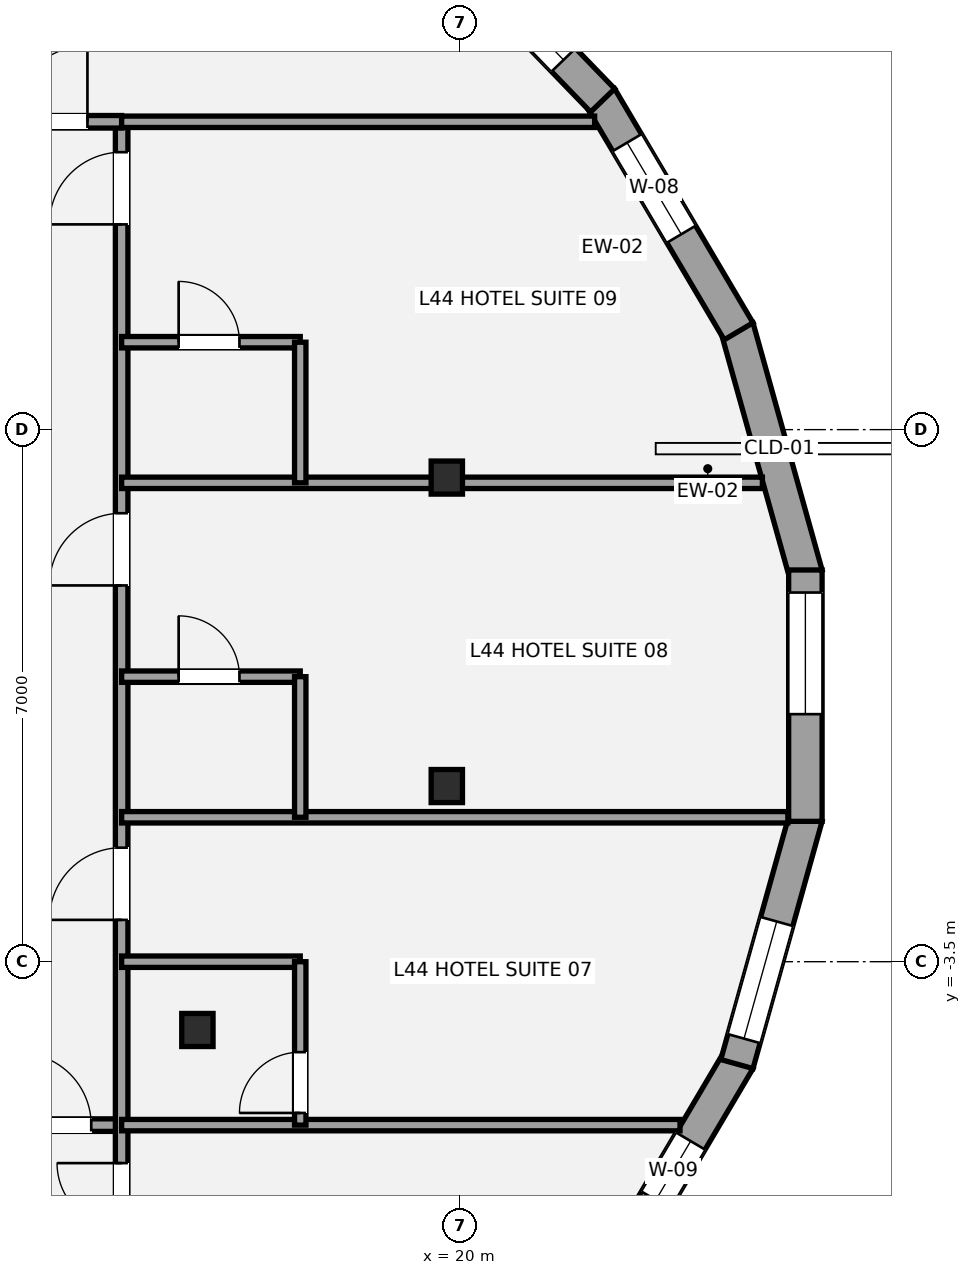
"""IFC4 building model, lengths in metres.
Left out: names, types, materials, properties, quantities, classifications, styles, units other than length and angle.
Written with IfcOpenShell. Run it as: python <this file> out.ifc"""

import sys

from ifc_helpers import new_model, si_unit, direction, frame, frame_2d, origin, origin_2d, place, context, subcontext, project, spatial, rectangle, i_section, extrude, element, fill, save


model = new_model("IFC4")
c1 = context("Model", 3, precision=1e-05, world=origin(), true_north=direction((0.0, 1.0)))
c2 = subcontext(c1, "Body", "Model", "MODEL_VIEW")
j1 = project(units=[si_unit("LENGTHUNIT", "METRE"), si_unit("PLANEANGLEUNIT", "RADIAN")], contexts=[c1])
p1 = place(None, origin())
s1 = spatial("IfcSite", under=j1, at=p1, CompositionType="ELEMENT")
p2 = place(p1, origin())
s2 = spatial("IfcBuilding", under=s1, at=p2, CompositionType="ELEMENT")
p3 = place(p2, frame((0.0, 0.0, 163.0)))
s3 = spatial("IfcBuildingStorey", under=s2, at=p3, CompositionType="ELEMENT", Elevation=163.0)
for number, where, z_axis, x_axis in (
    (1, (19.828, 2.869, 0.0), (0.0, 0.0, 1.0), (1.0, 0.0, 0.0)),
    (2, (16.547, -4.398, 0.0), (0.0, 0.0, 1.0), (1.0, 0.0, 0.0)),
    (3, (19.828, -1.189, 0.0), (0.0, 0.0, 1.0), (1.0, 0.0, 0.0)),
):
    element("IfcColumn", number, at=place(p3, frame(where, z_axis=z_axis, x_axis=x_axis)), inside=s3, PredefinedType="COLUMN", context=c2, shape_type="SweptSolid", body=[
        extrude(i_section(OverallWidth=0.412, OverallDepth=0.435, WebThickness=0.036, FlangeThickness=0.057, at=origin_2d()), origin(), (0.0, 0.0, 1.0), 3.2),
    ])
p4 = place(p3, frame((23.645, 4.846, 0.0), z_axis=(0.0, 0.0, 1.0), x_axis=(0.269235699479, -0.963074315993, 0.0)))
e4 = element("IfcWall", 4, at=p4, inside=s3, PredefinedType="STANDARD", context=c2, shape_type="SweptSolid", body=[
    extrude(rectangle(XDim=3.377, YDim=0.44, at=frame_2d((1.688, 0.0))), origin(), (0.0, 0.0, 1.0), 2.315),
])
p5 = place(p3, frame((21.847, 7.873, 0.0), z_axis=(0.0, 0.0, 1.0), x_axis=(0.508883387051, -0.860835465338, 0.0)))
e5 = element("IfcWall", 5, at=p5, inside=s3, PredefinedType="STANDARD", context=c2, shape_type="SweptSolid", body=[
    extrude(rectangle(XDim=3.577, YDim=0.44, at=frame_2d((1.788, 0.0))), origin(), (0.0, 0.0, 1.0), 2.315),
])
p6 = place(p5, frame((0.694, 0.0, 0.58)))
e6 = element("IfcOpeningElement", 6, at=p6, cuts=e5, PredefinedType="OPENING", context=c2, shape_type="SweptSolid", body=[
    extrude(rectangle(XDim=1.4, YDim=1.55, at=frame_2d((0.7, 0.775))), frame((0.0, 0.23, 0.0), z_axis=(0.0, -1.0, 0.0), x_axis=(1.0, 0.0, 0.0)), (0.0, 0.0, 1.0), 0.46),
])
p7 = place(p3, frame((19.192, 10.612, 0.0), z_axis=(0.0, 0.0, 1.0), x_axis=(0.694975307772, -0.719033602544, 0.0)))
e7 = element("IfcWall", 7, at=p7, inside=s3, PredefinedType="STANDARD", context=c2, shape_type="SweptSolid", body=[
    extrude(rectangle(XDim=3.866, YDim=0.44, at=frame_2d((1.933, 0.0))), origin(), (0.0, 0.0, 1.0), 2.315),
])
p8 = place(p7, frame((1.526, 0.0, 0.58)))
e8 = element("IfcOpeningElement", 8, at=p8, cuts=e7, PredefinedType="OPENING", context=c2, shape_type="SweptSolid", body=[
    extrude(rectangle(XDim=1.6, YDim=1.55, at=frame_2d((0.8, 0.775))), frame((0.0, 0.23, 0.0), z_axis=(0.0, -1.0, 0.0), x_axis=(1.0, 0.0, 0.0)), (0.0, 0.0, 1.0), 0.46),
])
p9 = place(p3, frame((23.667, -4.794, 0.0), z_axis=(0.0, 0.0, 1.0), x_axis=(-0.508883387051, -0.860835465338, 0.0)))
e9 = element("IfcWall", 9, at=p9, inside=s3, PredefinedType="STANDARD", context=c2, shape_type="SweptSolid", body=[
    extrude(rectangle(XDim=3.577, YDim=0.44, at=frame_2d((1.788, 0.0))), origin(), (0.0, 0.0, 1.0), 2.315),
])
p10 = place(p9, frame((1.239, 0.0, 0.58)))
e10 = element("IfcOpeningElement", 10, at=p10, cuts=e9, PredefinedType="OPENING", context=c2, shape_type="SweptSolid", body=[
    extrude(rectangle(XDim=0.9, YDim=1.35, at=frame_2d((0.45, 0.675))), frame((0.0, 0.23, 0.0), z_axis=(0.0, -1.0, 0.0), x_axis=(1.0, 0.0, 0.0)), (0.0, 0.0, 1.0), 0.46),
])
p11 = place(p3, frame((24.554, -1.594, 0.0), z_axis=(0.0, 0.0, 1.0), x_axis=(-0.269235699479, -0.963074315993, 0.0)))
e11 = element("IfcWall", 11, at=p11, inside=s3, PredefinedType="STANDARD", context=c2, shape_type="SweptSolid", body=[
    extrude(rectangle(XDim=3.377, YDim=0.44, at=frame_2d((1.688, 0.0))), origin(), (0.0, 0.0, 1.0), 2.315),
])
p12 = place(p11, frame((1.429, 0.0, 0.58)))
e12 = element("IfcOpeningElement", 12, at=p12, cuts=e11, PredefinedType="OPENING", context=c2, shape_type="SweptSolid", body=[
    extrude(rectangle(XDim=1.6, YDim=1.55, at=frame_2d((0.8, 0.775))), frame((0.0, 0.23, 0.0), z_axis=(0.0, -1.0, 0.0), x_axis=(1.0, 0.0, 0.0)), (0.0, 0.0, 1.0), 0.46),
])
p13 = place(p3, frame((24.546, 1.654, 0.0), z_axis=(0.0, 0.0, 1.0), x_axis=(0.0, -1.0, 0.0)))
e13 = element("IfcWall", 13, at=p13, inside=s3, PredefinedType="STANDARD", context=c2, shape_type="SweptSolid", body=[
    extrude(rectangle(XDim=3.307, YDim=0.44, at=frame_2d((1.654, 0.0))), origin(), (0.0, 0.0, 1.0), 2.315),
])
p14 = place(p13, frame((0.297, 0.0, 0.58)))
e14 = element("IfcOpeningElement", 14, at=p14, cuts=e13, PredefinedType="OPENING", context=c2, shape_type="SweptSolid", body=[
    extrude(rectangle(XDim=1.6, YDim=1.55, at=frame_2d((0.8, 0.775))), frame((0.0, 0.23, 0.0), z_axis=(0.0, -1.0, 0.0), x_axis=(1.0, 0.0, 0.0)), (0.0, 0.0, 1.0), 0.46),
])
p15 = place(p3, frame((-15.95, -5.65, 0.0), z_axis=(0.0, 0.0, 1.0), x_axis=(1.0, 0.0, 0.0)))
e15 = element("IfcWall", 15, at=p15, inside=s3, PredefinedType="PARTITIONING", context=c2, shape_type="SweptSolid", body=[
    extrude(rectangle(XDim=31.5, YDim=0.165, at=frame_2d((15.75, 0.0))), origin(), (0.0, 0.0, 1.0), 2.398),
])
p16 = place(p15, frame((4.8, 0.0, 0.0)))
e16 = element("IfcOpeningElement", 16, at=p16, cuts=e15, PredefinedType="OPENING", context=c2, shape_type="SweptSolid", body=[
    extrude(rectangle(XDim=0.95, YDim=2.15, at=frame_2d((0.475, 1.075))), frame((0.0, 0.093, 0.0), z_axis=(0.0, -1.0, 0.0), x_axis=(1.0, 0.0, 0.0)), (0.0, 0.0, 1.0), 0.185),
])
p17 = place(p15, frame((12.8, 0.0, 0.0)))
e17 = element("IfcOpeningElement", 17, at=p17, cuts=e15, PredefinedType="OPENING", context=c2, shape_type="SweptSolid", body=[
    extrude(rectangle(XDim=0.95, YDim=2.15, at=frame_2d((0.475, 1.075))), frame((0.0, 0.093, 0.0), z_axis=(0.0, -1.0, 0.0), x_axis=(1.0, 0.0, 0.0)), (0.0, 0.0, 1.0), 0.185),
])
p18 = place(p15, frame((20.8, 0.0, 0.0)))
e18 = element("IfcOpeningElement", 18, at=p18, cuts=e15, PredefinedType="OPENING", context=c2, shape_type="SweptSolid", body=[
    extrude(rectangle(XDim=0.95, YDim=2.15, at=frame_2d((0.475, 1.075))), frame((0.0, 0.093, 0.0), z_axis=(0.0, -1.0, 0.0), x_axis=(1.0, 0.0, 0.0)), (0.0, 0.0, 1.0), 0.185),
])
p19 = place(p15, frame((30.15, 0.0, 0.0)))
e19 = element("IfcOpeningElement", 19, at=p19, cuts=e15, PredefinedType="OPENING", context=c2, shape_type="SweptSolid", body=[
    extrude(rectangle(XDim=0.95, YDim=2.15, at=frame_2d((0.475, 1.075))), frame((0.0, 0.093, 0.0), z_axis=(0.0, -1.0, 0.0), x_axis=(1.0, 0.0, 0.0)), (0.0, 0.0, 1.0), 0.185),
])
p20 = place(p3, frame((15.55, -12.773, 0.0), z_axis=(0.0, 0.0, 1.0), x_axis=(0.0, 1.0, 0.0)))
e20 = element("IfcWall", 20, at=p20, inside=s3, PredefinedType="PARTITIONING", context=c2, shape_type="SweptSolid", body=[
    extrude(rectangle(XDim=20.323, YDim=0.165, at=frame_2d((10.162, 0.0))), origin(), (0.0, 0.0, 1.0), 2.473),
])
p21 = place(p20, frame((5.773, 0.0, 0.0)))
e21 = element("IfcOpeningElement", 21, at=p21, cuts=e20, PredefinedType="OPENING", context=c2, shape_type="SweptSolid", body=[
    extrude(rectangle(XDim=0.85, YDim=2.1, at=frame_2d((0.425, 1.05))), frame((0.0, 0.093, 0.0), z_axis=(0.0, -1.0, 0.0), x_axis=(1.0, 0.0, 0.0)), (0.0, 0.0, 1.0), 0.185),
])
p22 = place(p20, frame((9.823, 0.0, 0.0)))
e22 = element("IfcOpeningElement", 22, at=p22, cuts=e20, PredefinedType="OPENING", context=c2, shape_type="SweptSolid", body=[
    extrude(rectangle(XDim=0.95, YDim=2.15, at=frame_2d((0.475, 1.075))), frame((0.0, 0.093, 0.0), z_axis=(0.0, -1.0, 0.0), x_axis=(1.0, 0.0, 0.0)), (0.0, 0.0, 1.0), 0.185),
])
p23 = place(p20, frame((14.223, 0.0, 0.0)))
e23 = element("IfcOpeningElement", 23, at=p23, cuts=e20, PredefinedType="OPENING", context=c2, shape_type="SweptSolid", body=[
    extrude(rectangle(XDim=0.95, YDim=2.15, at=frame_2d((0.475, 1.075))), frame((0.0, 0.093, 0.0), z_axis=(0.0, -1.0, 0.0), x_axis=(1.0, 0.0, 0.0)), (0.0, 0.0, 1.0), 0.185),
])
p24 = place(p20, frame((18.973, 0.0, 0.0)))
e24 = element("IfcOpeningElement", 24, at=p24, cuts=e20, PredefinedType="OPENING", context=c2, shape_type="SweptSolid", body=[
    extrude(rectangle(XDim=0.95, YDim=2.15, at=frame_2d((0.475, 1.075))), frame((0.0, 0.093, 0.0), z_axis=(0.0, -1.0, 0.0), x_axis=(1.0, 0.0, 0.0)), (0.0, 0.0, 1.0), 0.185),
])
p25 = place(p3, frame((13.8, 7.55, 0.0), z_axis=(0.0, 0.0, 1.0), x_axis=(1.0, 0.0, 0.0)))
e25 = element("IfcWall", 25, at=p25, inside=s3, PredefinedType="PARTITIONING", context=c2, shape_type="SweptSolid", body=[
    extrude(rectangle(XDim=1.75, YDim=0.165, at=frame_2d((0.875, 0.0))), origin(), (0.0, 0.0, 1.0), 2.473),
])
p26 = place(p25, frame((0.3, 0.0, 0.0)))
e26 = element("IfcOpeningElement", 26, at=p26, cuts=e25, PredefinedType="OPENING", context=c2, shape_type="SweptSolid", body=[
    extrude(rectangle(XDim=1.0, YDim=2.15, at=frame_2d((0.5, 1.075))), frame((0.0, 0.093, 0.0), z_axis=(0.0, -1.0, 0.0), x_axis=(1.0, 0.0, 0.0)), (0.0, 0.0, 1.0), 0.185),
])
p27 = place(p3, frame((15.55, 7.55, 0.0), z_axis=(0.0, 0.0, 1.0), x_axis=(1.0, 0.0, 0.0)))
e27 = element("IfcWall", 27, at=p27, inside=s3, PredefinedType="PLUMBINGWALL", context=c2, shape_type="SweptSolid", body=[
    extrude(rectangle(XDim=6.223, YDim=0.15, at=frame_2d((3.112, 0.0))), origin(), (0.0, 0.0, 1.0), 2.473),
])
p28 = place(p3, frame((15.55, -5.65, 0.0), z_axis=(0.0, 0.0, 1.0), x_axis=(1.0, 0.0, 0.0)))
e28 = element("IfcWall", 28, at=p28, inside=s3, PredefinedType="PLUMBINGWALL", context=c2, shape_type="SweptSolid", body=[
    extrude(rectangle(XDim=7.346, YDim=0.15, at=frame_2d((3.673, 0.0))), origin(), (0.0, 0.0, 1.0), 2.473),
])
p29 = place(p3, frame((15.55, -1.6, 0.0), z_axis=(0.0, 0.0, 1.0), x_axis=(1.0, 0.0, 0.0)))
e29 = element("IfcWall", 29, at=p29, inside=s3, PredefinedType="PLUMBINGWALL", context=c2, shape_type="SweptSolid", body=[
    extrude(rectangle(XDim=8.766, YDim=0.15, at=frame_2d((4.383, 0.0))), origin(), (0.0, 0.0, 1.0), 2.398),
])
p30 = place(p3, frame((15.55, 2.8, 0.0), z_axis=(0.0, 0.0, 1.0), x_axis=(1.0, 0.0, 0.0)))
e30 = element("IfcWall", 30, at=p30, inside=s3, PredefinedType="PLUMBINGWALL", context=c2, shape_type="SweptSolid", body=[
    extrude(rectangle(XDim=8.43, YDim=0.15, at=frame_2d((4.215, 0.0))), origin(), (0.0, 0.0, 1.0), 2.473),
])
p31 = place(p3, frame((15.55, -3.5, 0.0), z_axis=(0.0, 0.0, 1.0), x_axis=(1.0, 0.0, 0.0)))
e31 = element("IfcWall", 31, at=p31, inside=s3, PredefinedType="PLUMBINGWALL", context=c2, shape_type="SweptSolid", body=[
    extrude(rectangle(XDim=2.35, YDim=0.15, at=frame_2d((1.175, 0.0))), origin(), (0.0, 0.0, 1.0), 2.398),
])
p32 = place(p3, frame((17.9, -5.65, 0.0), z_axis=(0.0, 0.0, 1.0), x_axis=(0.0, 1.0, 0.0)))
e32 = element("IfcWall", 32, at=p32, inside=s3, PredefinedType="PLUMBINGWALL", context=c2, shape_type="SweptSolid", body=[
    extrude(rectangle(XDim=2.15, YDim=0.15, at=frame_2d((1.075, 0.0))), origin(), (0.0, 0.0, 1.0), 3.02),
])
p33 = place(p32, frame((0.16, 0.0, 0.0)))
e33 = element("IfcOpeningElement", 33, at=p33, cuts=e32, PredefinedType="OPENING", context=c2, shape_type="SweptSolid", body=[
    extrude(rectangle(XDim=0.8, YDim=2.1, at=frame_2d((0.4, 1.05))), frame((0.0, 0.085, 0.0), z_axis=(0.0, -1.0, 0.0), x_axis=(1.0, 0.0, 0.0)), (0.0, 0.0, 1.0), 0.17),
])
p34 = place(p3, frame((15.55, 0.25, 0.0), z_axis=(0.0, 0.0, 1.0), x_axis=(1.0, 0.0, 0.0)))
e34 = element("IfcWall", 34, at=p34, inside=s3, PredefinedType="PLUMBINGWALL", context=c2, shape_type="SweptSolid", body=[
    extrude(rectangle(XDim=2.35, YDim=0.15, at=frame_2d((1.175, 0.0))), origin(), (0.0, 0.0, 1.0), 2.473),
])
p35 = place(p34, frame((0.75, 0.0, 0.0)))
e35 = element("IfcOpeningElement", 35, at=p35, cuts=e34, PredefinedType="OPENING", context=c2, shape_type="SweptSolid", body=[
    extrude(rectangle(XDim=0.8, YDim=2.1, at=frame_2d((0.4, 1.05))), frame((0.0, 0.085, 0.0), z_axis=(0.0, -1.0, 0.0), x_axis=(1.0, 0.0, 0.0)), (0.0, 0.0, 1.0), 0.17),
])
p36 = place(p3, frame((17.9, -1.6, 0.0), z_axis=(0.0, 0.0, 1.0), x_axis=(0.0, 1.0, 0.0)))
e36 = element("IfcWall", 36, at=p36, inside=s3, PredefinedType="PLUMBINGWALL", context=c2, shape_type="SweptSolid", body=[
    extrude(rectangle(XDim=1.85, YDim=0.15, at=frame_2d((0.925, 0.0))), origin(), (0.0, 0.0, 1.0), 3.02),
])
p37 = place(p3, frame((15.55, 4.65, 0.0), z_axis=(0.0, 0.0, 1.0), x_axis=(1.0, 0.0, 0.0)))
e37 = element("IfcWall", 37, at=p37, inside=s3, PredefinedType="PLUMBINGWALL", context=c2, shape_type="SweptSolid", body=[
    extrude(rectangle(XDim=2.35, YDim=0.15, at=frame_2d((1.175, 0.0))), origin(), (0.0, 0.0, 1.0), 2.473),
])
p38 = place(p37, frame((0.75, 0.0, 0.0)))
e38 = element("IfcOpeningElement", 38, at=p38, cuts=e37, PredefinedType="OPENING", context=c2, shape_type="SweptSolid", body=[
    extrude(rectangle(XDim=0.8, YDim=2.1, at=frame_2d((0.4, 1.05))), frame((0.0, 0.085, 0.0), z_axis=(0.0, -1.0, 0.0), x_axis=(1.0, 0.0, 0.0)), (0.0, 0.0, 1.0), 0.17),
])
p39 = place(p3, frame((17.9, 2.8, 0.0), z_axis=(0.0, 0.0, 1.0), x_axis=(0.0, 1.0, 0.0)))
e39 = element("IfcWall", 39, at=p39, inside=s3, PredefinedType="PLUMBINGWALL", context=c2, shape_type="SweptSolid", body=[
    extrude(rectangle(XDim=1.85, YDim=0.15, at=frame_2d((0.925, 0.0))), origin(), (0.0, 0.0, 1.0), 2.473),
])
p40 = place(p6, origin())
e40 = element("IfcWindow", 40, at=p40, inside=s3, PartitioningType="SINGLE_PANEL", PredefinedType="WINDOW", context=c2, shape_type="SweptSolid", body=[
    extrude(rectangle(XDim=1.4, YDim=1.55, at=frame_2d((0.7, 0.775))), frame((0.0, -0.01, 0.0), z_axis=(0.0, -1.0, 0.0), x_axis=(1.0, 0.0, 0.0)), (0.0, 0.0, 1.0), 0.06),
])
fill(e6, e40)
p41 = place(p8, origin())
e41 = element("IfcWindow", 41, at=p41, inside=s3, PartitioningType="SINGLE_PANEL", PredefinedType="WINDOW", context=c2, shape_type="SweptSolid", body=[
    extrude(rectangle(XDim=1.6, YDim=1.55, at=frame_2d((0.8, 0.775))), frame((0.0, -0.01, 0.0), z_axis=(0.0, -1.0, 0.0), x_axis=(1.0, 0.0, 0.0)), (0.0, 0.0, 1.0), 0.06),
])
fill(e8, e41)
p42 = place(p10, origin())
e42 = element("IfcWindow", 42, at=p42, inside=s3, PartitioningType="SINGLE_PANEL", PredefinedType="WINDOW", context=c2, shape_type="SweptSolid", body=[
    extrude(rectangle(XDim=0.9, YDim=1.35, at=frame_2d((0.45, 0.675))), frame((0.0, -0.01, 0.0), z_axis=(0.0, -1.0, 0.0), x_axis=(1.0, 0.0, 0.0)), (0.0, 0.0, 1.0), 0.06),
])
fill(e10, e42)
p43 = place(p12, origin())
e43 = element("IfcWindow", 43, at=p43, inside=s3, PartitioningType="SINGLE_PANEL", PredefinedType="WINDOW", context=c2, shape_type="SweptSolid", body=[
    extrude(rectangle(XDim=1.6, YDim=1.55, at=frame_2d((0.8, 0.775))), frame((0.0, -0.01, 0.0), z_axis=(0.0, -1.0, 0.0), x_axis=(1.0, 0.0, 0.0)), (0.0, 0.0, 1.0), 0.06),
])
fill(e12, e43)
p44 = place(p14, origin())
e44 = element("IfcWindow", 44, at=p44, inside=s3, PartitioningType="SINGLE_PANEL", PredefinedType="WINDOW", context=c2, shape_type="SweptSolid", body=[
    extrude(rectangle(XDim=1.6, YDim=1.55, at=frame_2d((0.8, 0.775))), frame((0.0, -0.01, 0.0), z_axis=(0.0, -1.0, 0.0), x_axis=(1.0, 0.0, 0.0)), (0.0, 0.0, 1.0), 0.06),
])
fill(e14, e44)
p45 = place(p26, origin())
e45 = element("IfcDoor", 45, at=p45, inside=s3, OperationType="SINGLE_SWING_RIGHT", PredefinedType="DOOR", context=c2, shape_type="SweptSolid", body=[
    extrude(rectangle(XDim=1.0, YDim=2.15, at=frame_2d((0.5, 1.075))), frame((0.0, 0.025, 0.0), z_axis=(0.0, -1.0, 0.0), x_axis=(1.0, 0.0, 0.0)), (0.0, 0.0, 1.0), 0.05),
])
fill(e26, e45)
p46 = place(p21, origin())
e46 = element("IfcDoor", 46, at=p46, inside=s3, OperationType="SINGLE_SWING_RIGHT", PredefinedType="DOOR", context=c2, shape_type="SweptSolid", body=[
    extrude(rectangle(XDim=0.85, YDim=2.1, at=frame_2d((0.425, 1.05))), frame((0.0, 0.025, 0.0), z_axis=(0.0, -1.0, 0.0), x_axis=(1.0, 0.0, 0.0)), (0.0, 0.0, 1.0), 0.05),
])
fill(e21, e46)
p47 = place(p19, origin())
e47 = element("IfcDoor", 47, at=p47, inside=s3, OperationType="SINGLE_SWING_LEFT", PredefinedType="DOOR", context=c2, shape_type="SweptSolid", body=[
    extrude(rectangle(XDim=0.95, YDim=2.15, at=frame_2d((0.475, 1.075))), frame((0.0, 0.025, 0.0), z_axis=(0.0, -1.0, 0.0), x_axis=(1.0, 0.0, 0.0)), (0.0, 0.0, 1.0), 0.05),
])
fill(e19, e47)
p48 = place(p22, origin())
e48 = element("IfcDoor", 48, at=p48, inside=s3, OperationType="SINGLE_SWING_LEFT", PredefinedType="DOOR", context=c2, shape_type="SweptSolid", body=[
    extrude(rectangle(XDim=0.95, YDim=2.15, at=frame_2d((0.475, 1.075))), frame((0.0, 0.025, 0.0), z_axis=(0.0, -1.0, 0.0), x_axis=(1.0, 0.0, 0.0)), (0.0, 0.0, 1.0), 0.05),
])
fill(e22, e48)
p49 = place(p33, origin())
e49 = element("IfcDoor", 49, at=p49, inside=s3, OperationType="SINGLE_SWING_LEFT", PredefinedType="DOOR", context=c2, shape_type="SweptSolid", body=[
    extrude(rectangle(XDim=0.8, YDim=2.1, at=frame_2d((0.4, 1.05))), frame((0.0, 0.025, 0.0), z_axis=(0.0, -1.0, 0.0), x_axis=(1.0, 0.0, 0.0)), (0.0, 0.0, 1.0), 0.05),
])
fill(e33, e49)
p50 = place(p23, origin())
e50 = element("IfcDoor", 50, at=p50, inside=s3, OperationType="SINGLE_SWING_LEFT", PredefinedType="DOOR", context=c2, shape_type="SweptSolid", body=[
    extrude(rectangle(XDim=0.95, YDim=2.15, at=frame_2d((0.475, 1.075))), frame((0.0, 0.025, 0.0), z_axis=(0.0, -1.0, 0.0), x_axis=(1.0, 0.0, 0.0)), (0.0, 0.0, 1.0), 0.05),
])
fill(e23, e50)
p51 = place(p35, origin())
e51 = element("IfcDoor", 51, at=p51, inside=s3, OperationType="SINGLE_SWING_LEFT", PredefinedType="DOOR", context=c2, shape_type="SweptSolid", body=[
    extrude(rectangle(XDim=0.8, YDim=2.1, at=frame_2d((0.4, 1.05))), frame((0.0, 0.025, 0.0), z_axis=(0.0, -1.0, 0.0), x_axis=(1.0, 0.0, 0.0)), (0.0, 0.0, 1.0), 0.05),
])
fill(e35, e51)
p52 = place(p24, origin())
e52 = element("IfcDoor", 52, at=p52, inside=s3, OperationType="SINGLE_SWING_LEFT", PredefinedType="DOOR", context=c2, shape_type="SweptSolid", body=[
    extrude(rectangle(XDim=0.95, YDim=2.15, at=frame_2d((0.475, 1.075))), frame((0.0, 0.025, 0.0), z_axis=(0.0, -1.0, 0.0), x_axis=(1.0, 0.0, 0.0)), (0.0, 0.0, 1.0), 0.05),
])
fill(e24, e52)
p53 = place(p38, origin())
e53 = element("IfcDoor", 53, at=p53, inside=s3, OperationType="SINGLE_SWING_LEFT", PredefinedType="DOOR", context=c2, shape_type="SweptSolid", body=[
    extrude(rectangle(XDim=0.8, YDim=2.1, at=frame_2d((0.4, 1.05))), frame((0.0, 0.025, 0.0), z_axis=(0.0, -1.0, 0.0), x_axis=(1.0, 0.0, 0.0)), (0.0, 0.0, 1.0), 0.05),
])
fill(e38, e53)
save(model, sys.argv[1])
